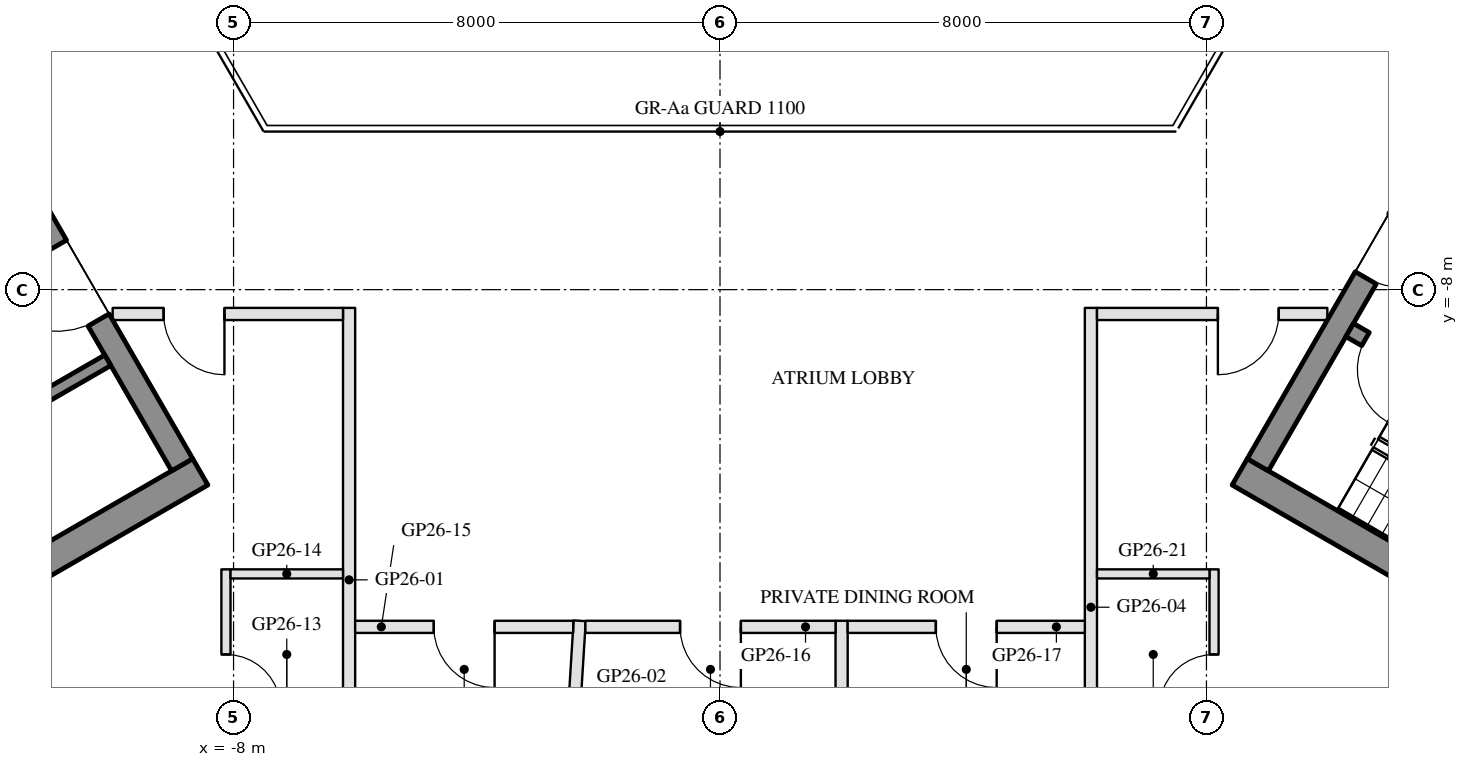
"""IFC4 building model, lengths in metres.
Left out: names, types, materials, properties, quantities, classifications, styles, units other than length and angle.
Written with IfcOpenShell. Run it as: python <this file> out.ifc"""

import sys

from ifc_helpers import new_model, si_unit, direction, frame, frame_2d, origin, place, context, subcontext, project, spatial, rectangle, extrude, element, fill, save


model = new_model("IFC4")
c1 = context("Model", 3, precision=1e-05, world=origin(), true_north=direction((0.0, 1.0)))
c2 = subcontext(c1, "Body", "Model", "MODEL_VIEW")
j1 = project(units=[si_unit("LENGTHUNIT", "METRE"), si_unit("PLANEANGLEUNIT", "RADIAN")], contexts=[c1])
p1 = place(None, origin())
s1 = spatial("IfcSite", under=j1, at=p1, CompositionType="ELEMENT")
p2 = place(p1, origin())
s2 = spatial("IfcBuilding", under=s1, at=p2, CompositionType="ELEMENT")
p3 = place(p2, frame((0.0, 0.0, 268.9)))
s3 = spatial("IfcBuildingStorey", under=s2, at=p3, CompositionType="ELEMENT", Elevation=268.9)
p4 = place(p3, frame((-8.547, -10.997, 0.0), z_axis=(0.0, 0.0, 1.0), x_axis=(-0.866030218785, -0.499991660082, 0.0)))
e1 = element("IfcWall", 1, at=p4, inside=s3, PredefinedType="SHEAR", context=c2, shape_type="SweptSolid", body=[
    extrude(rectangle(XDim=13.031, YDim=0.5, at=frame_2d((6.516, 0.0))), origin(), (0.0, 0.0, 1.0), 3.5),
])
p5 = place(p3, frame((-13.845, -2.22, 0.0), z_axis=(0.0, 0.0, 1.0), x_axis=(0.500004234368, -0.866022959057, 0.0)))
e2 = element("IfcWall", 2, at=p5, inside=s3, PredefinedType="SHEAR", context=c2, shape_type="SweptSolid", body=[
    extrude(rectangle(XDim=10.0, YDim=0.4, at=frame_2d((5.0, 0.0))), origin(), (0.0, 0.0, 1.0), 3.5),
])
p6 = place(p5, frame((3.55, 0.0, 0.0)))
e3 = element("IfcOpeningElement", 3, at=p6, cuts=e2, PredefinedType="OPENING", context=c2, shape_type="SweptSolid", body=[
    extrude(rectangle(XDim=1.1, YDim=2.1, at=frame_2d((0.55, 1.05))), frame((0.0, 0.21, 0.0), z_axis=(0.0, -1.0, 0.0), x_axis=(1.0, 0.0, 0.0)), (0.0, 0.0, 1.0), 0.42),
])
p7 = place(p5, frame((5.85, 0.0, 0.0)))
e4 = element("IfcOpeningElement", 4, at=p7, cuts=e2, PredefinedType="OPENING", context=c2, shape_type="SweptSolid", body=[
    extrude(rectangle(XDim=1.4, YDim=2.1, at=frame_2d((0.7, 1.05))), frame((0.0, 0.21, 0.0), z_axis=(0.0, -1.0, 0.0), x_axis=(1.0, 0.0, 0.0)), (0.0, 0.0, 1.0), 0.42),
])
p8 = place(p3, frame((-10.068, -9.162, 0.0), z_axis=(0.0, 0.0, 1.0), x_axis=(-0.866032725843, -0.499987317609, 0.0)))
e5 = element("IfcWall", 5, at=p8, inside=s3, PredefinedType="SHEAR", context=c2, shape_type="SweptSolid", body=[
    extrude(rectangle(XDim=10.16, YDim=0.2, at=frame_2d((5.08, 0.0))), origin(), (0.0, 0.0, 1.0), 3.5),
])
p9 = place(p8, frame((1.99, 0.0, 0.0)))
e6 = element("IfcOpeningElement", 6, at=p9, cuts=e5, PredefinedType="OPENING", context=c2, shape_type="SweptSolid", body=[
    extrude(rectangle(XDim=0.9, YDim=2.1, at=frame_2d((0.45, 1.05))), frame((0.0, 0.11, 0.0), z_axis=(0.0, -1.0, 0.0), x_axis=(1.0, 0.0, 0.0)), (0.0, 0.0, 1.0), 0.22),
])
p10 = place(p8, frame((7.07, 0.0, 0.0)))
e7 = element("IfcOpeningElement", 7, at=p10, cuts=e5, PredefinedType="OPENING", context=c2, shape_type="SweptSolid", body=[
    extrude(rectangle(XDim=0.9, YDim=2.1, at=frame_2d((0.45, 1.05))), frame((0.0, 0.11, 0.0), z_axis=(0.0, -1.0, 0.0), x_axis=(1.0, 0.0, 0.0)), (0.0, 0.0, 1.0), 0.22),
])
p11 = place(p3, frame((8.547, -10.997, 0.0), z_axis=(0.0, 0.0, 1.0), x_axis=(0.866030218785, -0.499991660082, 0.0)))
e8 = element("IfcWall", 8, at=p11, inside=s3, PredefinedType="SHEAR", context=c2, shape_type="SweptSolid", body=[
    extrude(rectangle(XDim=13.031, YDim=0.5, at=frame_2d((6.516, 0.0))), origin(), (0.0, 0.0, 1.0), 3.5),
])
p12 = place(p3, frame((8.845, -10.88, 0.0), z_axis=(0.0, 0.0, 1.0), x_axis=(0.500004234368, 0.866022959057, 0.0)))
e9 = element("IfcWall", 9, at=p12, inside=s3, PredefinedType="SHEAR", context=c2, shape_type="SweptSolid", body=[
    extrude(rectangle(XDim=10.0, YDim=0.4, at=frame_2d((5.0, 0.0))), origin(), (0.0, 0.0, 1.0), 3.5),
])
p13 = place(p12, frame((3.55, 0.0, 0.0)))
e10 = element("IfcOpeningElement", 10, at=p13, cuts=e9, PredefinedType="OPENING", context=c2, shape_type="SweptSolid", body=[
    extrude(rectangle(XDim=1.1, YDim=2.1, at=frame_2d((0.55, 1.05))), frame((0.0, 0.21, 0.0), z_axis=(0.0, -1.0, 0.0), x_axis=(1.0, 0.0, 0.0)), (0.0, 0.0, 1.0), 0.42),
])
p14 = place(p12, frame((5.85, 0.0, 0.0)))
e11 = element("IfcOpeningElement", 11, at=p14, cuts=e9, PredefinedType="OPENING", context=c2, shape_type="SweptSolid", body=[
    extrude(rectangle(XDim=1.4, YDim=2.1, at=frame_2d((0.7, 1.05))), frame((0.0, 0.21, 0.0), z_axis=(0.0, -1.0, 0.0), x_axis=(1.0, 0.0, 0.0)), (0.0, 0.0, 1.0), 0.42),
])
p15 = place(p3, frame((10.356, -8.664, 0.0), z_axis=(0.0, 0.0, 1.0), x_axis=(0.866028629588, -0.499994412703, 0.0)))
e12 = element("IfcWall", 12, at=p15, inside=s3, PredefinedType="SHEAR", context=c2, shape_type="SweptSolid", body=[
    extrude(rectangle(XDim=6.45, YDim=0.25, at=frame_2d((3.225, 0.0))), origin(), (0.0, 0.0, 1.0), 3.5),
])
p16 = place(p15, frame((0.3, 0.0, 0.0)))
e13 = element("IfcOpeningElement", 13, at=p16, cuts=e12, PredefinedType="OPENING", context=c2, shape_type="SweptSolid", body=[
    extrude(rectangle(XDim=1.0, YDim=2.1, at=frame_2d((0.5, 1.05))), frame((0.0, 0.135, 0.0), z_axis=(0.0, -1.0, 0.0), x_axis=(1.0, 0.0, 0.0)), (0.0, 0.0, 1.0), 0.27),
])
p17 = place(p3, frame((-6.1, -17.246, 0.0), z_axis=(0.0, 0.0, 1.0), x_axis=(0.0, 1.0, 0.0)))
e14 = element("IfcWall", 14, at=p17, inside=s3, PredefinedType="PARTITIONING", context=c2, shape_type="SweptSolid", body=[
    extrude(rectangle(XDim=8.946, YDim=0.2, at=frame_2d((4.473, 0.0))), origin(), (0.0, 0.0, 1.0), 3.16),
])
p18 = place(p3, frame((-2.544, -17.246, 0.0), z_axis=(0.0, 0.0, 1.0), x_axis=(0.062070892854, 0.998071743043, 0.0)))
e15 = element("IfcWall", 15, at=p18, inside=s3, PredefinedType="PARTITIONING", context=c2, shape_type="SweptSolid", body=[
    extrude(rectangle(XDim=3.807, YDim=0.2, at=frame_2d((1.904, 0.0))), origin(), (0.0, 0.0, 1.0), 3.16),
])
p19 = place(p3, frame((2.0, -18.146, 0.0), z_axis=(0.0, 0.0, 1.0), x_axis=(0.0, 1.0, 0.0)))
e16 = element("IfcWall", 16, at=p19, inside=s3, PredefinedType="PARTITIONING", context=c2, shape_type="SweptSolid", body=[
    extrude(rectangle(XDim=4.7, YDim=0.2, at=frame_2d((2.35, 0.0))), origin(), (0.0, 0.0, 1.0), 3.16),
])
p20 = place(p3, frame((6.1, -18.146, 0.0), z_axis=(0.0, 0.0, 1.0), x_axis=(0.0, 1.0, 0.0)))
e17 = element("IfcWall", 17, at=p20, inside=s3, PredefinedType="PARTITIONING", context=c2, shape_type="SweptSolid", body=[
    extrude(rectangle(XDim=9.846, YDim=0.2, at=frame_2d((4.923, 0.0))), origin(), (0.0, 0.0, 1.0), 3.16),
])
p21 = place(p3, frame((-6.2, -8.4, 0.0), z_axis=(0.0, 0.0, 1.0), x_axis=(-1.0, 0.0, 0.0)))
e18 = element("IfcWall", 18, at=p21, inside=s3, PredefinedType="PARTITIONING", context=c2, shape_type="SweptSolid", body=[
    extrude(rectangle(XDim=3.788, YDim=0.2, at=frame_2d((1.894, 0.0))), origin(), (0.0, 0.0, 1.0), 3.0),
])
p22 = place(p21, frame((1.95, 0.0, 0.0)))
e19 = element("IfcOpeningElement", 19, at=p22, cuts=e18, PredefinedType="OPENING", context=c2, shape_type="SweptSolid", body=[
    extrude(rectangle(XDim=1.0, YDim=2.1, at=frame_2d((0.5, 1.05))), frame((0.0, 0.11, 0.0), z_axis=(0.0, -1.0, 0.0), x_axis=(1.0, 0.0, 0.0)), (0.0, 0.0, 1.0), 0.22),
])
p23 = place(p3, frame((-8.125, -12.6, 0.0), z_axis=(0.0, 0.0, 1.0), x_axis=(0.0, -1.0, 0.0)))
e20 = element("IfcWall", 20, at=p23, inside=s3, PredefinedType="PARTITIONING", context=c2, shape_type="SweptSolid", body=[
    extrude(rectangle(XDim=2.8, YDim=0.15, at=frame_2d((1.4, 0.0))), origin(), (0.0, 0.0, 1.0), 3.55),
])
p24 = place(p23, frame((1.4, 0.0, 0.0)))
e21 = element("IfcOpeningElement", 21, at=p24, cuts=e20, PredefinedType="OPENING", context=c2, shape_type="SweptSolid", body=[
    extrude(rectangle(XDim=0.9, YDim=2.1, at=frame_2d((0.45, 1.05))), frame((0.0, 0.085, 0.0), z_axis=(0.0, -1.0, 0.0), x_axis=(1.0, 0.0, 0.0)), (0.0, 0.0, 1.0), 0.17),
])
p25 = place(p3, frame((-8.05, -12.675, 0.0), z_axis=(0.0, 0.0, 1.0), x_axis=(1.0, 0.0, 0.0)))
e22 = element("IfcWall", 22, at=p25, inside=s3, PredefinedType="PARTITIONING", context=c2, shape_type="SweptSolid", body=[
    extrude(rectangle(XDim=1.85, YDim=0.15, at=frame_2d((0.925, 0.0))), origin(), (0.0, 0.0, 1.0), 3.0),
])
p26 = place(p3, frame((-2.414, -13.546, 0.0), z_axis=(0.0, 0.0, 1.0), x_axis=(-1.0, 0.0, 0.0)))
e23 = element("IfcWall", 23, at=p26, inside=s3, PredefinedType="PARTITIONING", context=c2, shape_type="SweptSolid", body=[
    extrude(rectangle(XDim=3.586, YDim=0.2, at=frame_2d((1.793, 0.0))), origin(), (0.0, 0.0, 1.0), 3.0),
])
p27 = place(p26, frame((1.293, 0.0, 0.0)))
e24 = element("IfcOpeningElement", 24, at=p27, cuts=e23, PredefinedType="OPENING", context=c2, shape_type="SweptSolid", body=[
    extrude(rectangle(XDim=1.0, YDim=2.1, at=frame_2d((0.5, 1.05))), frame((0.0, 0.11, 0.0), z_axis=(0.0, -1.0, 0.0), x_axis=(1.0, 0.0, 0.0)), (0.0, 0.0, 1.0), 0.22),
])
p28 = place(p3, frame((1.9, -13.546, 0.0), z_axis=(0.0, 0.0, 1.0), x_axis=(-1.0, 0.0, 0.0)))
e25 = element("IfcWall", 25, at=p28, inside=s3, PredefinedType="PARTITIONING", context=c2, shape_type="SweptSolid", body=[
    extrude(rectangle(XDim=4.114, YDim=0.2, at=frame_2d((2.057, 0.0))), origin(), (0.0, 0.0, 1.0), 3.0),
])
p29 = place(p28, frame((1.557, 0.0, 0.0)))
e26 = element("IfcOpeningElement", 26, at=p29, cuts=e25, PredefinedType="OPENING", context=c2, shape_type="SweptSolid", body=[
    extrude(rectangle(XDim=1.0, YDim=2.1, at=frame_2d((0.5, 1.05))), frame((0.0, 0.11, 0.0), z_axis=(0.0, -1.0, 0.0), x_axis=(1.0, 0.0, 0.0)), (0.0, 0.0, 1.0), 0.22),
])
p30 = place(p3, frame((6.0, -13.546, 0.0), z_axis=(0.0, 0.0, 1.0), x_axis=(-1.0, 0.0, 0.0)))
e27 = element("IfcWall", 27, at=p30, inside=s3, PredefinedType="PARTITIONING", context=c2, shape_type="SweptSolid", body=[
    extrude(rectangle(XDim=3.9, YDim=0.2, at=frame_2d((1.95, 0.0))), origin(), (0.0, 0.0, 1.0), 3.0),
])
p31 = place(p30, frame((1.45, 0.0, 0.0)))
e28 = element("IfcOpeningElement", 28, at=p31, cuts=e27, PredefinedType="OPENING", context=c2, shape_type="SweptSolid", body=[
    extrude(rectangle(XDim=1.0, YDim=2.1, at=frame_2d((0.5, 1.05))), frame((0.0, 0.11, 0.0), z_axis=(0.0, -1.0, 0.0), x_axis=(1.0, 0.0, 0.0)), (0.0, 0.0, 1.0), 0.22),
])
p32 = place(p3, frame((9.988, -8.4, 0.0), z_axis=(0.0, 0.0, 1.0), x_axis=(-1.0, 0.0, 0.0)))
e29 = element("IfcWall", 29, at=p32, inside=s3, PredefinedType="PARTITIONING", context=c2, shape_type="SweptSolid", body=[
    extrude(rectangle(XDim=3.788, YDim=0.2, at=frame_2d((1.894, 0.0))), origin(), (0.0, 0.0, 1.0), 3.0),
])
p33 = place(p32, frame((0.8, 0.0, 0.0)))
e30 = element("IfcOpeningElement", 30, at=p33, cuts=e29, PredefinedType="OPENING", context=c2, shape_type="SweptSolid", body=[
    extrude(rectangle(XDim=1.0, YDim=2.1, at=frame_2d((0.5, 1.05))), frame((0.0, 0.11, 0.0), z_axis=(0.0, -1.0, 0.0), x_axis=(1.0, 0.0, 0.0)), (0.0, 0.0, 1.0), 0.22),
])
p34 = place(p3, frame((8.125, -15.4, 0.0), z_axis=(0.0, 0.0, 1.0), x_axis=(0.0, 1.0, 0.0)))
e31 = element("IfcWall", 31, at=p34, inside=s3, PredefinedType="PARTITIONING", context=c2, shape_type="SweptSolid", body=[
    extrude(rectangle(XDim=2.8, YDim=0.15, at=frame_2d((1.4, 0.0))), origin(), (0.0, 0.0, 1.0), 3.55),
])
p35 = place(p34, frame((0.5, 0.0, 0.0)))
e32 = element("IfcOpeningElement", 32, at=p35, cuts=e31, PredefinedType="OPENING", context=c2, shape_type="SweptSolid", body=[
    extrude(rectangle(XDim=0.9, YDim=2.1, at=frame_2d((0.45, 1.05))), frame((0.0, 0.085, 0.0), z_axis=(0.0, -1.0, 0.0), x_axis=(1.0, 0.0, 0.0)), (0.0, 0.0, 1.0), 0.17),
])
p36 = place(p3, frame((6.2, -12.675, 0.0), z_axis=(0.0, 0.0, 1.0), x_axis=(1.0, 0.0, 0.0)))
e33 = element("IfcWall", 33, at=p36, inside=s3, PredefinedType="PARTITIONING", context=c2, shape_type="SweptSolid", body=[
    extrude(rectangle(XDim=1.85, YDim=0.15, at=frame_2d((0.925, 0.0))), origin(), (0.0, 0.0, 1.0), 3.0),
])
p37 = place(p3, frame((10.075, -0.65, 0.0), z_axis=(0.0, 0.0, 1.0), x_axis=(0.499998569178, -0.866026229868, 0.0)))
e34 = element("IfcWall", 34, at=p37, inside=s3, PredefinedType="PARTITIONING", context=c2, shape_type="SweptSolid", body=[
    extrude(rectangle(XDim=4.388, YDim=0.2, at=frame_2d((2.194, 0.0))), origin(), (0.0, 0.0, 1.0), 3.0),
])
p38 = place(p37, frame((2.55, 0.0, 0.0)))
e35 = element("IfcOpeningElement", 35, at=p38, cuts=e34, PredefinedType="OPENING", context=c2, shape_type="SweptSolid", body=[
    extrude(rectangle(XDim=1.0, YDim=2.1, at=frame_2d((0.5, 1.05))), frame((0.0, 0.11, 0.0), z_axis=(0.0, -1.0, 0.0), x_axis=(1.0, 0.0, 0.0)), (0.0, 0.0, 1.0), 0.22),
])
p39 = place(p3, frame((-12.269, -4.45, 0.0), z_axis=(0.0, 0.0, 1.0), x_axis=(0.500023578739, 0.866011790165, 0.0)))
e36 = element("IfcWall", 36, at=p39, inside=s3, PredefinedType="PARTITIONING", context=c2, shape_type="SweptSolid", body=[
    extrude(rectangle(XDim=5.076, YDim=0.2, at=frame_2d((2.538, 0.0))), origin(), (0.0, 0.0, 1.0), 3.0),
])
p40 = place(p39, frame((2.038, 0.0, 0.0)))
e37 = element("IfcOpeningElement", 37, at=p40, cuts=e36, PredefinedType="OPENING", context=c2, shape_type="SweptSolid", body=[
    extrude(rectangle(XDim=1.0, YDim=2.1, at=frame_2d((0.5, 1.05))), frame((0.0, 0.11, 0.0), z_axis=(0.0, -1.0, 0.0), x_axis=(1.0, 0.0, 0.0)), (0.0, 0.0, 1.0), 0.22),
])
p41 = place(p7, frame((1.4, 0.0, 0.0), z_axis=(0.0, 0.0, 1.0), x_axis=(-1.0, 0.0, 0.0)))
e38 = element("IfcDoor", 38, at=p41, inside=s3, OperationType="DOUBLE_DOOR_SINGLE_SWING", PredefinedType="DOOR", context=c2, shape_type="SweptSolid", body=[
    extrude(rectangle(XDim=1.4, YDim=2.1, at=frame_2d((0.7, 1.05))), frame((0.0, 0.025, 0.0), z_axis=(0.0, -1.0, 0.0), x_axis=(1.0, 0.0, 0.0)), (0.0, 0.0, 1.0), 0.05),
])
fill(e4, e38)
p42 = place(p13, frame((1.1, 0.0, 0.0), z_axis=(0.0, 0.0, 1.0), x_axis=(-1.0, 0.0, 0.0)))
e39 = element("IfcDoor", 39, at=p42, inside=s3, OperationType="SINGLE_SWING_LEFT", PredefinedType="DOOR", context=c2, shape_type="SweptSolid", body=[
    extrude(rectangle(XDim=1.1, YDim=2.1, at=frame_2d((0.55, 1.05))), frame((0.0, 0.025, 0.0), z_axis=(0.0, -1.0, 0.0), x_axis=(1.0, 0.0, 0.0)), (0.0, 0.0, 1.0), 0.05),
])
fill(e10, e39)
p43 = place(p16, frame((1.0, 0.0, 0.0), z_axis=(0.0, 0.0, 1.0), x_axis=(-1.0, 0.0, 0.0)))
e40 = element("IfcDoor", 40, at=p43, inside=s3, OperationType="SINGLE_SWING_LEFT", PredefinedType="DOOR", context=c2, shape_type="SweptSolid", body=[
    extrude(rectangle(XDim=1.0, YDim=2.1, at=frame_2d((0.5, 1.05))), frame((0.0, 0.025, 0.0), z_axis=(0.0, -1.0, 0.0), x_axis=(1.0, 0.0, 0.0)), (0.0, 0.0, 1.0), 0.05),
])
fill(e13, e40)
p44 = place(p24, origin())
e41 = element("IfcDoor", 41, at=p44, inside=s3, OperationType="SINGLE_SWING_RIGHT", PredefinedType="DOOR", context=c2, shape_type="SweptSolid", body=[
    extrude(rectangle(XDim=0.9, YDim=2.1, at=frame_2d((0.45, 1.05))), frame((0.0, 0.025, 0.0), z_axis=(0.0, -1.0, 0.0), x_axis=(1.0, 0.0, 0.0)), (0.0, 0.0, 1.0), 0.05),
])
fill(e21, e41)
p45 = place(p22, origin())
e42 = element("IfcDoor", 42, at=p45, inside=s3, OperationType="SINGLE_SWING_LEFT", PredefinedType="DOOR", context=c2, shape_type="SweptSolid", body=[
    extrude(rectangle(XDim=1.0, YDim=2.1, at=frame_2d((0.5, 1.05))), frame((0.0, 0.025, 0.0), z_axis=(0.0, -1.0, 0.0), x_axis=(1.0, 0.0, 0.0)), (0.0, 0.0, 1.0), 0.05),
])
fill(e19, e42)
p46 = place(p27, origin())
e43 = element("IfcDoor", 43, at=p46, inside=s3, OperationType="SINGLE_SWING_LEFT", PredefinedType="DOOR", context=c2, shape_type="SweptSolid", body=[
    extrude(rectangle(XDim=1.0, YDim=2.1, at=frame_2d((0.5, 1.05))), frame((0.0, 0.025, 0.0), z_axis=(0.0, -1.0, 0.0), x_axis=(1.0, 0.0, 0.0)), (0.0, 0.0, 1.0), 0.05),
])
fill(e24, e43)
p47 = place(p29, origin())
e44 = element("IfcDoor", 44, at=p47, inside=s3, OperationType="SINGLE_SWING_LEFT", PredefinedType="DOOR", context=c2, shape_type="SweptSolid", body=[
    extrude(rectangle(XDim=1.0, YDim=2.1, at=frame_2d((0.5, 1.05))), frame((0.0, 0.025, 0.0), z_axis=(0.0, -1.0, 0.0), x_axis=(1.0, 0.0, 0.0)), (0.0, 0.0, 1.0), 0.05),
])
fill(e26, e44)
p48 = place(p31, origin())
e45 = element("IfcDoor", 45, at=p48, inside=s3, OperationType="SINGLE_SWING_LEFT", PredefinedType="DOOR", context=c2, shape_type="SweptSolid", body=[
    extrude(rectangle(XDim=1.0, YDim=2.1, at=frame_2d((0.5, 1.05))), frame((0.0, 0.025, 0.0), z_axis=(0.0, -1.0, 0.0), x_axis=(1.0, 0.0, 0.0)), (0.0, 0.0, 1.0), 0.05),
])
fill(e28, e45)
p49 = place(p35, origin())
e46 = element("IfcDoor", 46, at=p49, inside=s3, OperationType="SINGLE_SWING_LEFT", PredefinedType="DOOR", context=c2, shape_type="SweptSolid", body=[
    extrude(rectangle(XDim=0.9, YDim=2.1, at=frame_2d((0.45, 1.05))), frame((0.0, 0.025, 0.0), z_axis=(0.0, -1.0, 0.0), x_axis=(1.0, 0.0, 0.0)), (0.0, 0.0, 1.0), 0.05),
])
fill(e32, e46)
p50 = place(p33, origin())
e47 = element("IfcDoor", 47, at=p50, inside=s3, OperationType="SINGLE_SWING_RIGHT", PredefinedType="DOOR", context=c2, shape_type="SweptSolid", body=[
    extrude(rectangle(XDim=1.0, YDim=2.1, at=frame_2d((0.5, 1.05))), frame((0.0, 0.025, 0.0), z_axis=(0.0, -1.0, 0.0), x_axis=(1.0, 0.0, 0.0)), (0.0, 0.0, 1.0), 0.05),
])
fill(e30, e47)
save(model, sys.argv[1])
